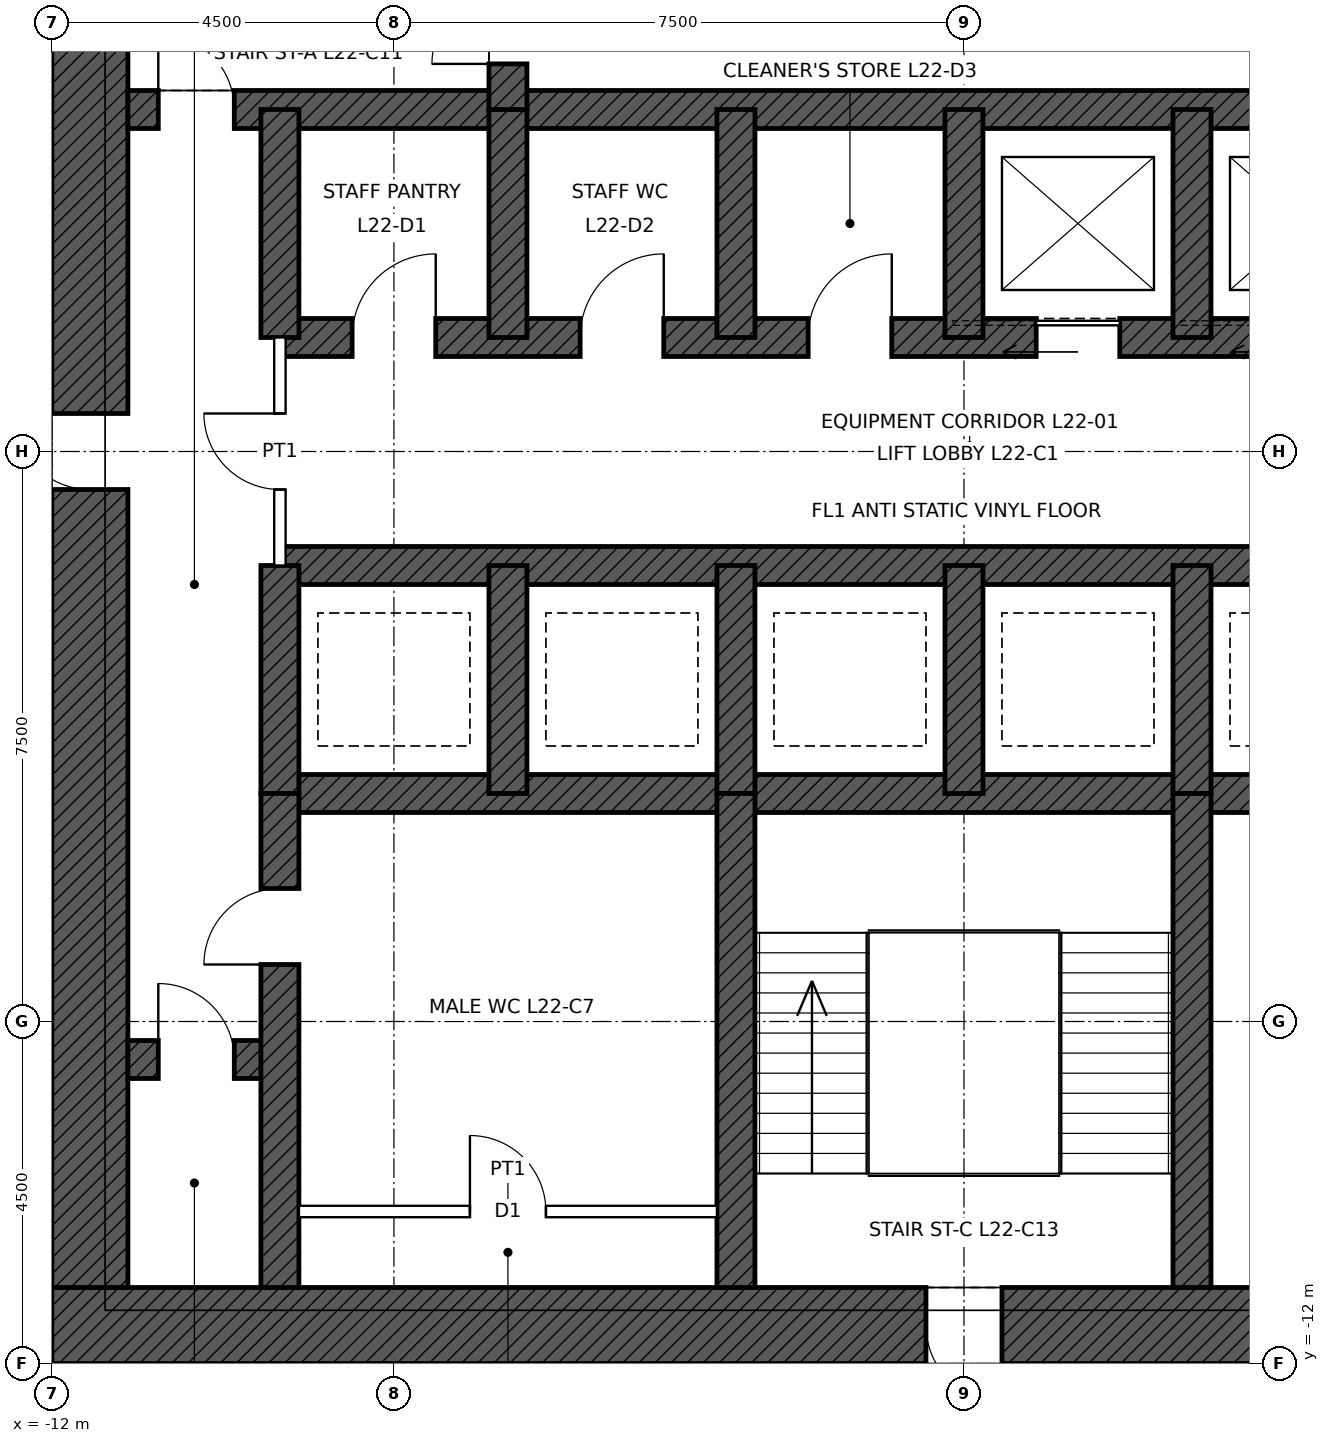
"""IFC4 building model, lengths in metres.
Left out: names, types, materials, properties, quantities, classifications, styles, units other than length and angle.
Written with IfcOpenShell. Run it as: python <this file> out.ifc"""

import sys

from ifc_helpers import new_model, si_unit, direction, frame, frame_2d, origin, place, context, subcontext, project, spatial, rectangle, extrude, element, fill, save


model = new_model("IFC4")
c1 = context("Model", 3, precision=1e-05, world=origin(), true_north=direction((0.0, 1.0)))
c2 = subcontext(c1, "Body", "Model", "MODEL_VIEW")
j1 = project(units=[si_unit("LENGTHUNIT", "METRE"), si_unit("PLANEANGLEUNIT", "RADIAN")], contexts=[c1])
p1 = place(None, origin())
s1 = spatial("IfcSite", under=j1, at=p1, CompositionType="ELEMENT")
p2 = place(p1, origin())
s2 = spatial("IfcBuilding", under=s1, at=p2, CompositionType="ELEMENT")
p3 = place(p2, frame((0.0, 0.0, 113.4)))
s3 = spatial("IfcBuildingStorey", under=s2, at=p3, CompositionType="ELEMENT", Elevation=113.4)
p4 = place(p3, frame((12.0, -11.5, 0.0), z_axis=(0.0, 0.0, 1.0), x_axis=(-1.0, 0.0, 0.0)))
e1 = element("IfcWall", 1, at=p4, inside=s3, PredefinedType="SHEAR", context=c2, shape_type="SweptSolid", body=[
    extrude(rectangle(XDim=24.0, YDim=1.0, at=frame_2d((12.0, 0.0))), origin(), (0.0, 0.0, 1.0), 4.5),
])
p5 = place(p4, frame((11.5, 0.0, 0.0)))
e2 = element("IfcOpeningElement", 2, at=p5, cuts=e1, PredefinedType="OPENING", context=c2, shape_type="SweptSolid", body=[
    extrude(rectangle(XDim=1.0, YDim=2.1, at=frame_2d((0.5, 1.05))), frame((0.0, 0.51, 0.0), z_axis=(0.0, -1.0, 0.0), x_axis=(1.0, 0.0, 0.0)), (0.0, 0.0, 1.0), 1.02),
])
p6 = place(p4, frame((1.0, 0.0, 0.0)))
e3 = element("IfcOpeningElement", 3, at=p6, cuts=e1, PredefinedType="OPENING", context=c2, shape_type="SweptSolid", body=[
    extrude(rectangle(XDim=1.0, YDim=2.4, at=frame_2d((0.5, 1.2))), frame((0.0, 0.51, 0.0), z_axis=(0.0, -1.0, 0.0), x_axis=(1.0, 0.0, 0.0)), (0.0, 0.0, 1.0), 1.02),
])
p7 = place(p3, frame((-11.5, -11.0, 0.0), z_axis=(0.0, 0.0, 1.0), x_axis=(0.0, 1.0, 0.0)))
e4 = element("IfcWall", 4, at=p7, inside=s3, PredefinedType="SHEAR", context=c2, shape_type="SweptSolid", body=[
    extrude(rectangle(XDim=22.0, YDim=1.0, at=frame_2d((11.0, 0.0))), origin(), (0.0, 0.0, 1.0), 4.5),
])
p8 = place(p7, frame((10.5, 0.0, 0.0)))
e5 = element("IfcOpeningElement", 5, at=p8, cuts=e4, PredefinedType="OPENING", context=c2, shape_type="SweptSolid", body=[
    extrude(rectangle(XDim=1.0, YDim=2.4, at=frame_2d((0.5, 1.2))), frame((0.0, 0.51, 0.0), z_axis=(0.0, -1.0, 0.0), x_axis=(1.0, 0.0, 0.0)), (0.0, 0.0, 1.0), 1.02),
])
p9 = place(p3, frame((-11.0, 4.5, 0.0), z_axis=(0.0, 0.0, 1.0), x_axis=(1.0, 0.0, 0.0)))
e6 = element("IfcWall", 6, at=p9, inside=s3, PredefinedType="SHEAR", context=c2, shape_type="SweptSolid", body=[
    extrude(rectangle(XDim=22.0, YDim=0.5, at=frame_2d((11.0, 0.0))), origin(), (0.0, 0.0, 1.0), 4.5),
])
p10 = place(p9, frame((0.4, 0.0, 0.0)))
e7 = element("IfcOpeningElement", 7, at=p10, cuts=e6, PredefinedType="OPENING", context=c2, shape_type="SweptSolid", body=[
    extrude(rectangle(XDim=1.0, YDim=2.1, at=frame_2d((0.5, 1.05))), frame((0.0, 0.26, 0.0), z_axis=(0.0, -1.0, 0.0), x_axis=(1.0, 0.0, 0.0)), (0.0, 0.0, 1.0), 0.52),
])
p11 = place(p9, frame((20.6, 0.0, 0.0)))
e8 = element("IfcOpeningElement", 8, at=p11, cuts=e6, PredefinedType="OPENING", context=c2, shape_type="SweptSolid", body=[
    extrude(rectangle(XDim=1.0, YDim=2.1, at=frame_2d((0.5, 1.05))), frame((0.0, 0.26, 0.0), z_axis=(0.0, -1.0, 0.0), x_axis=(1.0, 0.0, 0.0)), (0.0, 0.0, 1.0), 0.52),
])
p12 = place(p3, frame((-9.0, 1.5, 0.0), z_axis=(0.0, 0.0, 1.0), x_axis=(1.0, 0.0, 0.0)))
e9 = element("IfcWall", 9, at=p12, inside=s3, PredefinedType="SHEAR", context=c2, shape_type="SweptSolid", body=[
    extrude(rectangle(XDim=18.0, YDim=0.5, at=frame_2d((9.0, 0.0))), origin(), (0.0, 0.0, 1.0), 4.5),
])
p13 = place(p12, frame((9.95, 0.0, 0.0)))
e10 = element("IfcOpeningElement", 10, at=p13, cuts=e9, PredefinedType="OPENING", context=c2, shape_type="SweptSolid", body=[
    extrude(rectangle(XDim=1.1, YDim=2.1, at=frame_2d((0.55, 1.05))), frame((0.0, 0.26, 0.0), z_axis=(0.0, -1.0, 0.0), x_axis=(1.0, 0.0, 0.0)), (0.0, 0.0, 1.0), 0.52),
])
p14 = place(p12, frame((12.95, 0.0, 0.0)))
e11 = element("IfcOpeningElement", 11, at=p14, cuts=e9, PredefinedType="OPENING", context=c2, shape_type="SweptSolid", body=[
    extrude(rectangle(XDim=1.1, YDim=2.1, at=frame_2d((0.55, 1.05))), frame((0.0, 0.26, 0.0), z_axis=(0.0, -1.0, 0.0), x_axis=(1.0, 0.0, 0.0)), (0.0, 0.0, 1.0), 0.52),
])
p15 = place(p12, frame((15.95, 0.0, 0.0)))
e12 = element("IfcOpeningElement", 12, at=p15, cuts=e9, PredefinedType="OPENING", context=c2, shape_type="SweptSolid", body=[
    extrude(rectangle(XDim=1.1, YDim=2.1, at=frame_2d((0.55, 1.05))), frame((0.0, 0.26, 0.0), z_axis=(0.0, -1.0, 0.0), x_axis=(1.0, 0.0, 0.0)), (0.0, 0.0, 1.0), 0.52),
])
p16 = place(p12, frame((0.95, 0.0, 0.0)))
e13 = element("IfcOpeningElement", 13, at=p16, cuts=e9, PredefinedType="OPENING", context=c2, shape_type="SweptSolid", body=[
    extrude(rectangle(XDim=1.1, YDim=2.1, at=frame_2d((0.55, 1.05))), frame((0.0, 0.26, 0.0), z_axis=(0.0, -1.0, 0.0), x_axis=(1.0, 0.0, 0.0)), (0.0, 0.0, 1.0), 0.52),
])
p17 = place(p12, frame((3.95, 0.0, 0.0)))
e14 = element("IfcOpeningElement", 14, at=p17, cuts=e9, PredefinedType="OPENING", context=c2, shape_type="SweptSolid", body=[
    extrude(rectangle(XDim=1.1, YDim=2.1, at=frame_2d((0.55, 1.05))), frame((0.0, 0.26, 0.0), z_axis=(0.0, -1.0, 0.0), x_axis=(1.0, 0.0, 0.0)), (0.0, 0.0, 1.0), 0.52),
])
p18 = place(p12, frame((6.95, 0.0, 0.0)))
e15 = element("IfcOpeningElement", 15, at=p18, cuts=e9, PredefinedType="OPENING", context=c2, shape_type="SweptSolid", body=[
    extrude(rectangle(XDim=1.1, YDim=2.1, at=frame_2d((0.55, 1.05))), frame((0.0, 0.26, 0.0), z_axis=(0.0, -1.0, 0.0), x_axis=(1.0, 0.0, 0.0)), (0.0, 0.0, 1.0), 0.52),
])
for number, where, z_axis, x_axis in (
    (16, (-9.0, -1.5, 0.0), (0.0, 0.0, 1.0), (1.0, 0.0, 0.0)),
    (17, (-9.0, -4.5, 0.0), (0.0, 0.0, 1.0), (1.0, 0.0, 0.0)),
):
    element("IfcWall", number, at=place(p3, frame(where, z_axis=z_axis, x_axis=x_axis)), inside=s3, PredefinedType="SHEAR", context=c2, shape_type="SweptSolid", body=[
        extrude(rectangle(XDim=18.0, YDim=0.5, at=frame_2d((9.0, 0.0))), origin(), (0.0, 0.0, 1.0), 4.5),
    ])
p19 = place(p3, frame((-11.0, -8.0, 0.0), z_axis=(0.0, 0.0, 1.0), x_axis=(1.0, 0.0, 0.0)))
e18 = element("IfcWall", 18, at=p19, inside=s3, PredefinedType="SHEAR", context=c2, shape_type="SweptSolid", body=[
    extrude(rectangle(XDim=2.0, YDim=0.5, at=frame_2d((1.0, 0.0))), origin(), (0.0, 0.0, 1.0), 4.5),
])
p20 = place(p19, frame((0.4, 0.0, 0.0)))
e19 = element("IfcOpeningElement", 19, at=p20, cuts=e18, PredefinedType="OPENING", context=c2, shape_type="SweptSolid", body=[
    extrude(rectangle(XDim=1.0, YDim=2.1, at=frame_2d((0.5, 1.05))), frame((0.0, 0.26, 0.0), z_axis=(0.0, -1.0, 0.0), x_axis=(1.0, 0.0, 0.0)), (0.0, 0.0, 1.0), 0.52),
])
for number, where, z_axis, x_axis in (
    (20, (-9.0, 1.5, 0.0), (0.0, 0.0, 1.0), (0.0, 1.0, 0.0)),
    (21, (-9.0, -4.5, 0.0), (0.0, 0.0, 1.0), (0.0, 1.0, 0.0)),
    (22, (-6.0, 1.5, 0.0), (0.0, 0.0, 1.0), (0.0, 1.0, 0.0)),
    (23, (-3.0, 1.5, 0.0), (0.0, 0.0, 1.0), (0.0, 1.0, 0.0)),
    (24, (0.0, 1.5, 0.0), (0.0, 0.0, 1.0), (0.0, 1.0, 0.0)),
    (25, (3.0, 1.5, 0.0), (0.0, 0.0, 1.0), (0.0, 1.0, 0.0)),
    (26, (-6.0, -4.5, 0.0), (0.0, 0.0, 1.0), (0.0, 1.0, 0.0)),
    (27, (-3.0, -4.5, 0.0), (0.0, 0.0, 1.0), (0.0, 1.0, 0.0)),
    (28, (0.0, -4.5, 0.0), (0.0, 0.0, 1.0), (0.0, 1.0, 0.0)),
    (29, (3.0, -4.5, 0.0), (0.0, 0.0, 1.0), (0.0, 1.0, 0.0)),
):
    element("IfcWall", number, at=place(p3, frame(where, z_axis=z_axis, x_axis=x_axis)), inside=s3, PredefinedType="SHEAR", context=c2, shape_type="SweptSolid", body=[
        extrude(rectangle(XDim=3.0, YDim=0.5, at=frame_2d((1.5, 0.0))), origin(), (0.0, 0.0, 1.0), 4.5),
    ])
p21 = place(p3, frame((-6.0, 4.5, 0.0), z_axis=(0.0, 0.0, 1.0), x_axis=(0.0, 1.0, 0.0)))
e30 = element("IfcWall", 30, at=p21, inside=s3, PredefinedType="SHEAR", context=c2, shape_type="SweptSolid", body=[
    extrude(rectangle(XDim=6.5, YDim=0.5, at=frame_2d((3.25, 0.0))), origin(), (0.0, 0.0, 1.0), 4.5),
])
p22 = place(p21, frame((0.6, 0.0, 0.0)))
e31 = element("IfcOpeningElement", 31, at=p22, cuts=e30, PredefinedType="OPENING", context=c2, shape_type="SweptSolid", body=[
    extrude(rectangle(XDim=1.0, YDim=2.1, at=frame_2d((0.5, 1.05))), frame((0.0, 0.26, 0.0), z_axis=(0.0, -1.0, 0.0), x_axis=(1.0, 0.0, 0.0)), (0.0, 0.0, 1.0), 0.52),
])
p23 = place(p3, frame((-9.0, -11.0, 0.0), z_axis=(0.0, 0.0, 1.0), x_axis=(0.0, 1.0, 0.0)))
e32 = element("IfcWall", 32, at=p23, inside=s3, PredefinedType="SHEAR", context=c2, shape_type="SweptSolid", body=[
    extrude(rectangle(XDim=6.5, YDim=0.5, at=frame_2d((3.25, 0.0))), origin(), (0.0, 0.0, 1.0), 4.5),
])
p24 = place(p23, frame((4.25, 0.0, 0.0)))
e33 = element("IfcOpeningElement", 33, at=p24, cuts=e32, PredefinedType="OPENING", context=c2, shape_type="SweptSolid", body=[
    extrude(rectangle(XDim=1.0, YDim=2.1, at=frame_2d((0.5, 1.05))), frame((0.0, 0.26, 0.0), z_axis=(0.0, -1.0, 0.0), x_axis=(1.0, 0.0, 0.0)), (0.0, 0.0, 1.0), 0.52),
])
for number, where, z_axis, x_axis in (
    (34, (-3.0, -11.0, 0.0), (0.0, 0.0, 1.0), (0.0, 1.0, 0.0)),
    (35, (3.0, -11.0, 0.0), (0.0, 0.0, 1.0), (0.0, 1.0, 0.0)),
):
    element("IfcWall", number, at=place(p3, frame(where, z_axis=z_axis, x_axis=x_axis)), inside=s3, PredefinedType="SHEAR", context=c2, shape_type="SweptSolid", body=[
        extrude(rectangle(XDim=6.5, YDim=0.5, at=frame_2d((3.25, 0.0))), origin(), (0.0, 0.0, 1.0), 4.5),
    ])
p25 = place(p3, frame((-8.75, -10.0, 0.0), z_axis=(0.0, 0.0, 1.0), x_axis=(1.0, 0.0, 0.0)))
e36 = element("IfcWall", 36, at=p25, inside=s3, PredefinedType="PARTITIONING", context=c2, shape_type="SweptSolid", body=[
    extrude(rectangle(XDim=5.5, YDim=0.15, at=frame_2d((2.75, 0.0))), origin(), (0.0, 0.0, 1.0), 4.25),
])
p26 = place(p25, frame((2.25, 0.0, 0.0)))
e37 = element("IfcOpeningElement", 37, at=p26, cuts=e36, PredefinedType="OPENING", context=c2, shape_type="SweptSolid", body=[
    extrude(rectangle(XDim=1.0, YDim=2.1, at=frame_2d((0.5, 1.05))), frame((0.0, 0.085, 0.0), z_axis=(0.0, -1.0, 0.0), x_axis=(1.0, 0.0, 0.0)), (0.0, 0.0, 1.0), 0.17),
])
p27 = place(p3, frame((-9.0, -1.5, 0.0), z_axis=(0.0, 0.0, 1.0), x_axis=(0.0, 1.0, 0.0)))
e38 = element("IfcWall", 38, at=p27, inside=s3, PredefinedType="PARTITIONING", context=c2, shape_type="SweptSolid", body=[
    extrude(rectangle(XDim=3.0, YDim=0.15, at=frame_2d((1.5, 0.0))), origin(), (0.0, 0.0, 1.0), 4.25),
])
p28 = place(p27, frame((1.0, 0.0, 0.0)))
e39 = element("IfcOpeningElement", 39, at=p28, cuts=e38, PredefinedType="OPENING", context=c2, shape_type="SweptSolid", body=[
    extrude(rectangle(XDim=1.0, YDim=2.4, at=frame_2d((0.5, 1.2))), frame((0.0, 0.085, 0.0), z_axis=(0.0, -1.0, 0.0), x_axis=(1.0, 0.0, 0.0)), (0.0, 0.0, 1.0), 0.17),
])
p29 = place(p10, origin())
e40 = element("IfcDoor", 40, at=p29, inside=s3, OperationType="SINGLE_SWING_LEFT", PredefinedType="DOOR", context=c2, shape_type="SweptSolid", body=[
    extrude(rectangle(XDim=1.0, YDim=2.1, at=frame_2d((0.5, 1.05))), frame((0.0, 0.025, 0.0), z_axis=(0.0, -1.0, 0.0), x_axis=(1.0, 0.0, 0.0)), (0.0, 0.0, 1.0), 0.05),
])
fill(e7, e40)
p30 = place(p22, origin())
e41 = element("IfcDoor", 41, at=p30, inside=s3, OperationType="SINGLE_SWING_LEFT", PredefinedType="DOOR", context=c2, shape_type="SweptSolid", body=[
    extrude(rectangle(XDim=1.0, YDim=2.1, at=frame_2d((0.5, 1.05))), frame((0.0, 0.025, 0.0), z_axis=(0.0, -1.0, 0.0), x_axis=(1.0, 0.0, 0.0)), (0.0, 0.0, 1.0), 0.05),
])
fill(e31, e41)
p31 = place(p5, origin())
e42 = element("IfcDoor", 42, at=p31, inside=s3, OperationType="SINGLE_SWING_LEFT", PredefinedType="DOOR", context=c2, shape_type="SweptSolid", body=[
    extrude(rectangle(XDim=1.0, YDim=2.1, at=frame_2d((0.5, 1.05))), frame((0.0, 0.485, 0.0), z_axis=(0.0, -1.0, 0.0), x_axis=(1.0, 0.0, 0.0)), (0.0, 0.0, 1.0), 0.05),
])
fill(e2, e42)
p32 = place(p8, origin())
e43 = element("IfcDoor", 43, at=p32, inside=s3, OperationType="SINGLE_SWING_RIGHT", PredefinedType="DOOR", context=c2, shape_type="SweptSolid", body=[
    extrude(rectangle(XDim=1.0, YDim=2.4, at=frame_2d((0.5, 1.2))), frame((0.0, 0.485, 0.0), z_axis=(0.0, -1.0, 0.0), x_axis=(1.0, 0.0, 0.0)), (0.0, 0.0, 1.0), 0.05),
])
fill(e5, e43)
p33 = place(p24, origin())
e44 = element("IfcDoor", 44, at=p33, inside=s3, OperationType="SINGLE_SWING_LEFT", PredefinedType="DOOR", context=c2, shape_type="SweptSolid", body=[
    extrude(rectangle(XDim=1.0, YDim=2.1, at=frame_2d((0.5, 1.05))), frame((0.0, 0.025, 0.0), z_axis=(0.0, -1.0, 0.0), x_axis=(1.0, 0.0, 0.0)), (0.0, 0.0, 1.0), 0.05),
])
fill(e33, e44)
p34 = place(p20, origin())
e45 = element("IfcDoor", 45, at=p34, inside=s3, OperationType="SINGLE_SWING_LEFT", PredefinedType="DOOR", context=c2, shape_type="SweptSolid", body=[
    extrude(rectangle(XDim=1.0, YDim=2.1, at=frame_2d((0.5, 1.05))), frame((0.0, 0.025, 0.0), z_axis=(0.0, -1.0, 0.0), x_axis=(1.0, 0.0, 0.0)), (0.0, 0.0, 1.0), 0.05),
])
fill(e19, e45)
p35 = place(p13, origin())
e46 = element("IfcDoor", 46, at=p35, inside=s3, OperationType="SLIDING_TO_LEFT", PredefinedType="DOOR", context=c2, shape_type="SweptSolid", body=[
    extrude(rectangle(XDim=1.1, YDim=2.1, at=frame_2d((0.55, 1.05))), frame((0.0, 0.025, 0.0), z_axis=(0.0, -1.0, 0.0), x_axis=(1.0, 0.0, 0.0)), (0.0, 0.0, 1.0), 0.05),
])
fill(e10, e46)
p36 = place(p26, origin())
e47 = element("IfcDoor", 47, at=p36, inside=s3, OperationType="SINGLE_SWING_LEFT", PredefinedType="DOOR", context=c2, shape_type="SweptSolid", body=[
    extrude(rectangle(XDim=1.0, YDim=2.1, at=frame_2d((0.5, 1.05))), frame((0.0, 0.025, 0.0), z_axis=(0.0, -1.0, 0.0), x_axis=(1.0, 0.0, 0.0)), (0.0, 0.0, 1.0), 0.05),
])
fill(e37, e47)
p37 = place(p28, origin())
e48 = element("IfcDoor", 48, at=p37, inside=s3, OperationType="SINGLE_SWING_RIGHT", PredefinedType="DOOR", context=c2, shape_type="SweptSolid", body=[
    extrude(rectangle(XDim=1.0, YDim=2.4, at=frame_2d((0.5, 1.2))), frame((0.0, 0.025, 0.0), z_axis=(0.0, -1.0, 0.0), x_axis=(1.0, 0.0, 0.0)), (0.0, 0.0, 1.0), 0.05),
])
fill(e39, e48)
p38 = place(p16, origin())
e49 = element("IfcDoor", 49, at=p38, inside=s3, OperationType="SINGLE_SWING_RIGHT", PredefinedType="DOOR", context=c2, shape_type="SweptSolid", body=[
    extrude(rectangle(XDim=1.1, YDim=2.1, at=frame_2d((0.55, 1.05))), frame((0.0, 0.025, 0.0), z_axis=(0.0, -1.0, 0.0), x_axis=(1.0, 0.0, 0.0)), (0.0, 0.0, 1.0), 0.05),
])
fill(e13, e49)
p39 = place(p17, origin())
e50 = element("IfcDoor", 50, at=p39, inside=s3, OperationType="SINGLE_SWING_RIGHT", PredefinedType="DOOR", context=c2, shape_type="SweptSolid", body=[
    extrude(rectangle(XDim=1.1, YDim=2.1, at=frame_2d((0.55, 1.05))), frame((0.0, 0.025, 0.0), z_axis=(0.0, -1.0, 0.0), x_axis=(1.0, 0.0, 0.0)), (0.0, 0.0, 1.0), 0.05),
])
fill(e14, e50)
p40 = place(p18, origin())
e51 = element("IfcDoor", 51, at=p40, inside=s3, OperationType="SINGLE_SWING_RIGHT", PredefinedType="DOOR", context=c2, shape_type="SweptSolid", body=[
    extrude(rectangle(XDim=1.1, YDim=2.1, at=frame_2d((0.55, 1.05))), frame((0.0, 0.025, 0.0), z_axis=(0.0, -1.0, 0.0), x_axis=(1.0, 0.0, 0.0)), (0.0, 0.0, 1.0), 0.05),
])
fill(e15, e51)
save(model, sys.argv[1])
